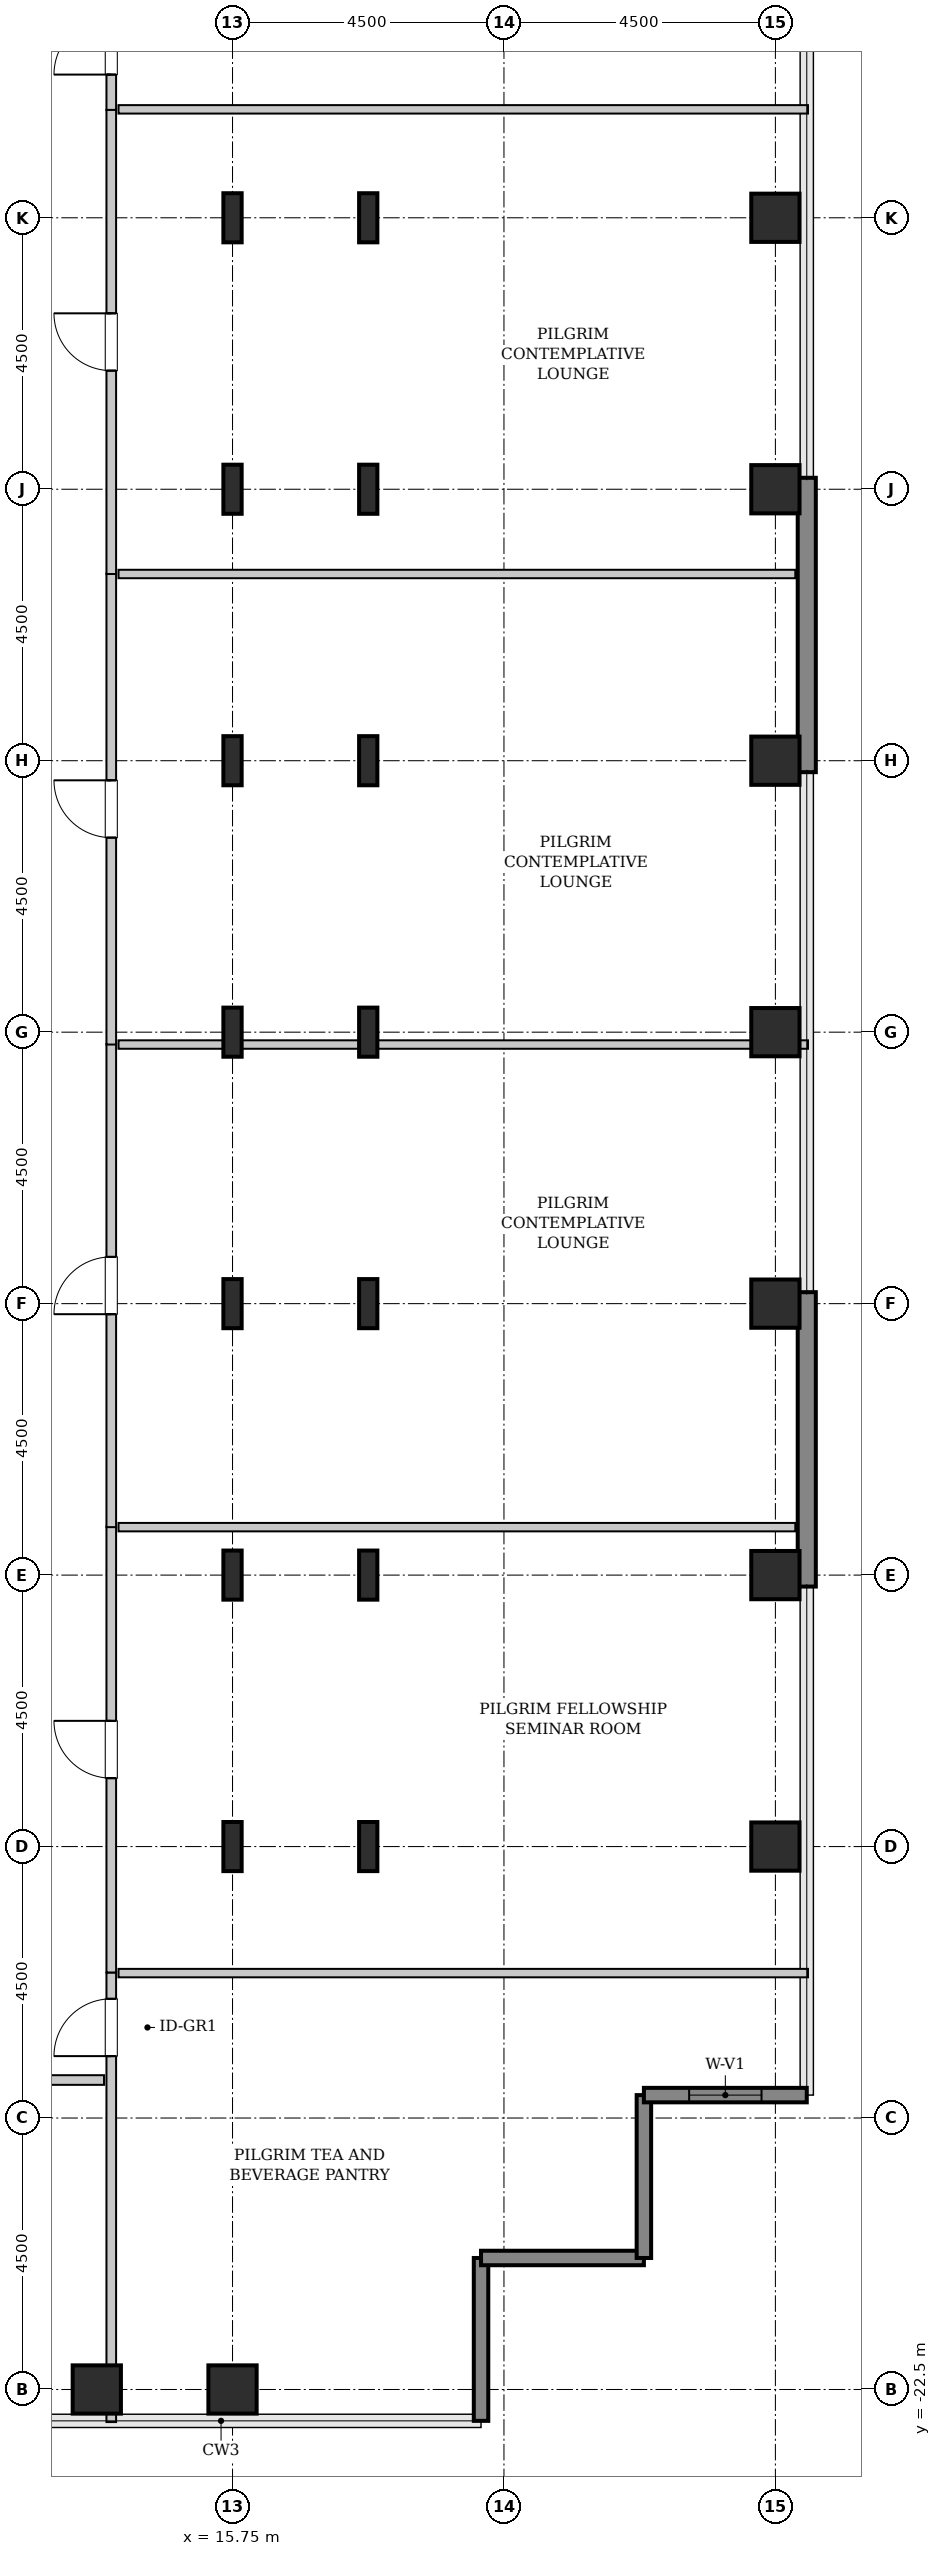
"""IFC4 building model, lengths in metres.
Left out: names, types, materials, properties, quantities, classifications, styles, units other than length and angle.
Written with IfcOpenShell. Run it as: python <this file> out.ifc"""

import sys

from ifc_helpers import new_model, si_unit, direction, frame, frame_2d, origin, origin_2d, place, context, subcontext, project, spatial, rectangle, hollow_rectangle, i_section, extrude, source, transform, mapped, element, fill, save


model = new_model("IFC4")
c1 = context("Model", 3, precision=1e-05, world=origin(), true_north=direction((0.0, 1.0)))
c2 = subcontext(c1, "Body", "Model", "MODEL_VIEW")
j1 = project(units=[si_unit("LENGTHUNIT", "METRE"), si_unit("PLANEANGLEUNIT", "RADIAN")], contexts=[c1])
p1 = place(None, origin())
s1 = spatial("IfcSite", under=j1, at=p1, CompositionType="ELEMENT")
p2 = place(p1, origin())
s2 = spatial("IfcBuilding", under=s1, at=p2, CompositionType="ELEMENT")
p3 = place(p2, frame((0.0, 0.0, 194.4)))
s3 = spatial("IfcBuildingStorey", under=s2, at=p3, CompositionType="ELEMENT", Elevation=194.4)
m1 = source(origin(), c2, "Body", "SweptSolid", [
    extrude(hollow_rectangle(XDim=0.8, YDim=0.8, WallThickness=0.04, InnerFilletRadius=0.04, OuterFilletRadius=0.08, at=origin_2d()), origin(), (0.0, 0.0, 1.0), 3.8),
])
for number, where, z_axis, x_axis in (
    (1, (13.5, -22.5, 0.0), (0.0, 0.0, 1.0), (1.0, 0.0, 0.0)),
    (2, (15.75, -22.5, 0.0), (0.0, 0.0, 1.0), (1.0, 0.0, 0.0)),
):
    element("IfcColumn", number, at=place(p3, frame(where, z_axis=z_axis, x_axis=x_axis)), inside=s3, PredefinedType="COLUMN", context=c2, shape_type="MappedRepresentation", body=[
        mapped(m1, transform((0.0, 0.0, 0.0), x_axis=(1.0, 0.0, 0.0), y_axis=(0.0, 1.0, 0.0), z_axis=(0.0, 0.0, 1.0), scale=1.0)),
    ])
m2 = source(origin(), c2, "Body", "SweptSolid", [
    extrude(i_section(OverallWidth=0.303, OverallDepth=0.814, WebThickness=0.021, FlangeThickness=0.04, FilletRadius=0.03, at=origin_2d()), origin(), (0.0, 0.0, 1.0), 3.8),
])
for number, where, z_axis, x_axis in (
    (3, (15.75, -13.5, 0.0), (0.0, 0.0, 1.0), (1.0, 0.0, 0.0)),
    (4, (15.75, -9.0, 0.0), (0.0, 0.0, 1.0), (1.0, 0.0, 0.0)),
    (5, (15.75, -4.5, 0.0), (0.0, 0.0, 1.0), (1.0, 0.0, 0.0)),
    (6, (15.75, 0.0, 0.0), (0.0, 0.0, 1.0), (1.0, 0.0, 0.0)),
    (7, (15.75, 4.5, 0.0), (0.0, 0.0, 1.0), (1.0, 0.0, 0.0)),
    (8, (15.75, 9.0, 0.0), (0.0, 0.0, 1.0), (1.0, 0.0, 0.0)),
    (9, (15.75, 13.5, 0.0), (0.0, 0.0, 1.0), (1.0, 0.0, 0.0)),
    (10, (18.0, -13.5, 0.0), (0.0, 0.0, 1.0), (1.0, 0.0, 0.0)),
    (11, (18.0, -9.0, 0.0), (0.0, 0.0, 1.0), (1.0, 0.0, 0.0)),
    (12, (18.0, -4.5, 0.0), (0.0, 0.0, 1.0), (1.0, 0.0, 0.0)),
    (13, (18.0, 0.0, 0.0), (0.0, 0.0, 1.0), (1.0, 0.0, 0.0)),
    (14, (18.0, 4.5, 0.0), (0.0, 0.0, 1.0), (1.0, 0.0, 0.0)),
    (15, (18.0, 9.0, 0.0), (0.0, 0.0, 1.0), (1.0, 0.0, 0.0)),
    (16, (18.0, 13.5, 0.0), (0.0, 0.0, 1.0), (1.0, 0.0, 0.0)),
):
    element("IfcColumn", number, at=place(p3, frame(where, z_axis=z_axis, x_axis=x_axis)), inside=s3, PredefinedType="COLUMN", context=c2, shape_type="MappedRepresentation", body=[
        mapped(m2, transform((0.0, 0.0, 0.0), x_axis=(1.0, 0.0, 0.0), y_axis=(0.0, 1.0, 0.0), z_axis=(0.0, 0.0, 1.0), scale=1.0)),
    ])
for number, where, z_axis, x_axis in (
    (17, (24.75, -13.5, 0.0), (0.0, 0.0, 1.0), (1.0, 0.0, 0.0)),
    (18, (24.75, -9.0, 0.0), (0.0, 0.0, 1.0), (1.0, 0.0, 0.0)),
    (19, (24.75, -4.5, 0.0), (0.0, 0.0, 1.0), (1.0, 0.0, 0.0)),
    (20, (24.75, 0.0, 0.0), (0.0, 0.0, 1.0), (1.0, 0.0, 0.0)),
    (21, (24.75, 4.5, 0.0), (0.0, 0.0, 1.0), (1.0, 0.0, 0.0)),
    (22, (24.75, 9.0, 0.0), (0.0, 0.0, 1.0), (1.0, 0.0, 0.0)),
    (23, (24.75, 13.5, 0.0), (0.0, 0.0, 1.0), (1.0, 0.0, 0.0)),
):
    element("IfcColumn", number, at=place(p3, frame(where, z_axis=z_axis, x_axis=x_axis)), inside=s3, PredefinedType="COLUMN", context=c2, shape_type="MappedRepresentation", body=[
        mapped(m1, transform((0.0, 0.0, 0.0), x_axis=(1.0, 0.0, 0.0), y_axis=(0.0, 1.0, 0.0), z_axis=(0.0, 0.0, 1.0), scale=1.0)),
    ])
m3 = source(origin(), c2, "Body", "SweptSolid", [
    extrude(rectangle(XDim=4.88, YDim=0.3, at=frame_2d((2.44, 0.0))), origin(), (0.0, 0.0, 1.0), 3.55),
])
for number, where, z_axis, x_axis in (
    (24, (25.27, -9.19, 0.0), (0.0, 0.0, 1.0), (0.0, 1.0, 0.0)),
    (25, (25.27, 4.31, 0.0), (0.0, 0.0, 1.0), (0.0, 1.0, 0.0)),
):
    element("IfcWall", number, at=place(p3, frame(where, z_axis=z_axis, x_axis=x_axis)), inside=s3, PredefinedType="SHEAR", context=c2, shape_type="MappedRepresentation", body=[
        mapped(m3, transform((0.0, 0.0, 0.0), x_axis=(1.0, 0.0, 0.0), y_axis=(0.0, 1.0, 0.0), z_axis=(0.0, 0.0, 1.0), scale=1.0)),
    ])
m4 = source(origin(), c2, "Body", "SweptSolid", [
    extrude(rectangle(XDim=2.7, YDim=0.24, at=frame_2d((1.35, 0.0))), origin(), (0.0, 0.0, 1.0), 3.55),
])
for number, where, z_axis, x_axis in (
    (26, (19.87, -23.02, 0.0), (0.0, 0.0, 1.0), (0.0, 1.0, 0.0)),
    (27, (19.87, -20.32, 0.0), (0.0, 0.0, 1.0), (1.0, 0.0, 0.0)),
    (28, (22.57, -20.32, 0.0), (0.0, 0.0, 1.0), (0.0, 1.0, 0.0)),
):
    element("IfcWall", number, at=place(p3, frame(where, z_axis=z_axis, x_axis=x_axis)), inside=s3, PredefinedType="SHEAR", context=c2, shape_type="MappedRepresentation", body=[
        mapped(m4, transform((0.0, 0.0, 0.0), x_axis=(1.0, 0.0, 0.0), y_axis=(0.0, 1.0, 0.0), z_axis=(0.0, 0.0, 1.0), scale=1.0)),
    ])
p4 = place(p3, frame((22.57, -17.62, 0.0), z_axis=(0.0, 0.0, 1.0), x_axis=(1.0, 0.0, 0.0)))
e29 = element("IfcWall", 29, at=p4, inside=s3, PredefinedType="SHEAR", context=c2, shape_type="MappedRepresentation", body=[
    mapped(m4, transform((0.0, 0.0, 0.0), x_axis=(1.0, 0.0, 0.0), y_axis=(0.0, 1.0, 0.0), z_axis=(0.0, 0.0, 1.0), scale=1.0)),
])
p5 = place(p4, frame((0.75, 0.0, 0.85)))
e30 = element("IfcOpeningElement", 30, at=p5, cuts=e29, PredefinedType="OPENING", context=c2, shape_type="SweptSolid", body=[
    extrude(rectangle(XDim=1.2, YDim=1.8, at=frame_2d((0.6, 0.9))), frame((0.0, 0.13, 0.0), z_axis=(0.0, -1.0, 0.0), x_axis=(1.0, 0.0, 0.0)), (0.0, 0.0, 1.0), 0.26),
])
m5 = source(origin(), c2, "Body", "SweptSolid", [
    extrude(rectangle(XDim=7.453, YDim=0.16, at=frame_2d((3.726, 0.0))), origin(), (0.0, 0.0, 1.0), 3.535),
])
p6 = place(p3, frame((13.74, -23.04, 0.0), z_axis=(0.0, 0.0, 1.0), x_axis=(0.0, 1.0, 0.0)))
e31 = element("IfcWall", 31, at=p6, inside=s3, PredefinedType="PARTITIONING", context=c2, shape_type="MappedRepresentation", body=[
    mapped(m5, transform((0.0, 0.0, 0.0), x_axis=(1.0, 0.0, 0.0), y_axis=(0.0, 1.0, 0.0), z_axis=(0.0, 0.0, 1.0), scale=1.0)),
])
p7 = place(p6, frame((6.066, 0.0, 0.0)))
e32 = element("IfcOpeningElement", 32, at=p7, cuts=e31, PredefinedType="OPENING", context=c2, shape_type="SweptSolid", body=[
    extrude(rectangle(XDim=0.95, YDim=2.1, at=frame_2d((0.475, 1.05))), frame((0.0, 0.09, 0.0), z_axis=(0.0, -1.0, 0.0), x_axis=(1.0, 0.0, 0.0)), (0.0, 0.0, 1.0), 0.18),
])
m6 = source(origin(), c2, "Body", "SweptSolid", [
    extrude(rectangle(XDim=11.43, YDim=0.14, at=frame_2d((5.715, 0.0))), origin(), (0.0, 0.0, 1.0), 3.535),
])
p8 = place(p3, frame((13.86, -15.597, 0.0), z_axis=(0.0, 0.0, 1.0), x_axis=(1.0, 0.0, 0.0)))
e33 = element("IfcWall", 33, at=p8, inside=s3, PredefinedType="PARTITIONING", context=c2, shape_type="MappedRepresentation", body=[
    mapped(m6, transform((0.0, 0.0, 0.0), x_axis=(1.0, 0.0, 0.0), y_axis=(0.0, 1.0, 0.0), z_axis=(0.0, 0.0, 1.0), scale=1.0)),
])
m7 = source(origin(), c2, "Body", "SweptSolid", [
    extrude(rectangle(XDim=7.392, YDim=0.16, at=frame_2d((3.696, 0.0))), origin(), (0.0, 0.0, 1.0), 3.535),
])
p9 = place(p3, frame((13.74, -15.587, 0.0), z_axis=(0.0, 0.0, 1.0), x_axis=(0.0, 1.0, 0.0)))
e34 = element("IfcWall", 34, at=p9, inside=s3, PredefinedType="PARTITIONING", context=c2, shape_type="MappedRepresentation", body=[
    mapped(m7, transform((0.0, 0.0, 0.0), x_axis=(1.0, 0.0, 0.0), y_axis=(0.0, 1.0, 0.0), z_axis=(0.0, 0.0, 1.0), scale=1.0)),
])
p10 = place(p9, frame((3.221, 0.0, 0.0)))
e35 = element("IfcOpeningElement", 35, at=p10, cuts=e34, PredefinedType="OPENING", context=c2, shape_type="SweptSolid", body=[
    extrude(rectangle(XDim=0.95, YDim=2.1, at=frame_2d((0.475, 1.05))), frame((0.0, 0.09, 0.0), z_axis=(0.0, -1.0, 0.0), x_axis=(1.0, 0.0, 0.0)), (0.0, 0.0, 1.0), 0.18),
])
m8 = source(origin(), c2, "Body", "SweptSolid", [
    extrude(rectangle(XDim=11.22, YDim=0.14, at=frame_2d((5.61, 0.0))), origin(), (0.0, 0.0, 1.0), 3.535),
])
p11 = place(p3, frame((13.86, -8.205, 0.0), z_axis=(0.0, 0.0, 1.0), x_axis=(1.0, 0.0, 0.0)))
e36 = element("IfcWall", 36, at=p11, inside=s3, PredefinedType="PARTITIONING", context=c2, shape_type="MappedRepresentation", body=[
    mapped(m8, transform((0.0, 0.0, 0.0), x_axis=(1.0, 0.0, 0.0), y_axis=(0.0, 1.0, 0.0), z_axis=(0.0, 0.0, 1.0), scale=1.0)),
])
m9 = source(origin(), c2, "Body", "SweptSolid", [
    extrude(rectangle(XDim=8.01, YDim=0.16, at=frame_2d((4.005, 0.0))), origin(), (0.0, 0.0, 1.0), 3.535),
])
p12 = place(p3, frame((13.74, -8.205, 0.0), z_axis=(0.0, 0.0, 1.0), x_axis=(0.0, 1.0, 0.0)))
e37 = element("IfcWall", 37, at=p12, inside=s3, PredefinedType="PARTITIONING", context=c2, shape_type="MappedRepresentation", body=[
    mapped(m9, transform((0.0, 0.0, 0.0), x_axis=(1.0, 0.0, 0.0), y_axis=(0.0, 1.0, 0.0), z_axis=(0.0, 0.0, 1.0), scale=1.0)),
])
p13 = place(p12, frame((3.53, 0.0, 0.0)))
e38 = element("IfcOpeningElement", 38, at=p13, cuts=e37, PredefinedType="OPENING", context=c2, shape_type="SweptSolid", body=[
    extrude(rectangle(XDim=0.95, YDim=2.1, at=frame_2d((0.475, 1.05))), frame((0.0, 0.09, 0.0), z_axis=(0.0, -1.0, 0.0), x_axis=(1.0, 0.0, 0.0)), (0.0, 0.0, 1.0), 0.18),
])
m10 = source(origin(), c2, "Body", "SweptSolid", [
    extrude(rectangle(XDim=11.43, YDim=0.14, at=frame_2d((5.715, 0.0))), origin(), (0.0, 0.0, 1.0), 2.875),
])
p14 = place(p3, frame((13.86, -0.205, 0.0), z_axis=(0.0, 0.0, 1.0), x_axis=(1.0, 0.0, 0.0)))
e39 = element("IfcWall", 39, at=p14, inside=s3, PredefinedType="PARTITIONING", context=c2, shape_type="MappedRepresentation", body=[
    mapped(m10, transform((0.0, 0.0, 0.0), x_axis=(1.0, 0.0, 0.0), y_axis=(0.0, 1.0, 0.0), z_axis=(0.0, 0.0, 1.0), scale=1.0)),
])
m11 = source(origin(), c2, "Body", "SweptSolid", [
    extrude(rectangle(XDim=7.81, YDim=0.16, at=frame_2d((3.905, 0.0))), origin(), (0.0, 0.0, 1.0), 3.535),
])
p15 = place(p3, frame((13.74, -0.205, 0.0), z_axis=(0.0, 0.0, 1.0), x_axis=(0.0, 1.0, 0.0)))
e40 = element("IfcWall", 40, at=p15, inside=s3, PredefinedType="PARTITIONING", context=c2, shape_type="MappedRepresentation", body=[
    mapped(m11, transform((0.0, 0.0, 0.0), x_axis=(1.0, 0.0, 0.0), y_axis=(0.0, 1.0, 0.0), z_axis=(0.0, 0.0, 1.0), scale=1.0)),
])
p16 = place(p15, frame((3.43, 0.0, 0.0)))
e41 = element("IfcOpeningElement", 41, at=p16, cuts=e40, PredefinedType="OPENING", context=c2, shape_type="SweptSolid", body=[
    extrude(rectangle(XDim=0.95, YDim=2.1, at=frame_2d((0.475, 1.05))), frame((0.0, 0.09, 0.0), z_axis=(0.0, -1.0, 0.0), x_axis=(1.0, 0.0, 0.0)), (0.0, 0.0, 1.0), 0.18),
])
p17 = place(p3, frame((13.86, 7.595, 0.0), z_axis=(0.0, 0.0, 1.0), x_axis=(1.0, 0.0, 0.0)))
e42 = element("IfcWall", 42, at=p17, inside=s3, PredefinedType="PARTITIONING", context=c2, shape_type="MappedRepresentation", body=[
    mapped(m8, transform((0.0, 0.0, 0.0), x_axis=(1.0, 0.0, 0.0), y_axis=(0.0, 1.0, 0.0), z_axis=(0.0, 0.0, 1.0), scale=1.0)),
])
m12 = source(origin(), c2, "Body", "SweptSolid", [
    extrude(rectangle(XDim=7.752, YDim=0.16, at=frame_2d((3.876, 0.0))), origin(), (0.0, 0.0, 1.0), 3.535),
])
p18 = place(p3, frame((13.74, 15.288, 0.0), z_axis=(0.0, 0.0, 1.0), x_axis=(0.0, 1.0, 0.0)))
e43 = element("IfcWall", 43, at=p18, inside=s3, PredefinedType="PARTITIONING", context=c2, shape_type="MappedRepresentation", body=[
    mapped(m12, transform((0.0, 0.0, 0.0), x_axis=(1.0, 0.0, 0.0), y_axis=(0.0, 1.0, 0.0), z_axis=(0.0, 0.0, 1.0), scale=1.0)),
])
p19 = place(p18, frame((0.586, 0.0, 0.0)))
e44 = element("IfcOpeningElement", 44, at=p19, cuts=e43, PredefinedType="OPENING", context=c2, shape_type="SweptSolid", body=[
    extrude(rectangle(XDim=0.95, YDim=2.1, at=frame_2d((0.475, 1.05))), frame((0.0, 0.09, 0.0), z_axis=(0.0, -1.0, 0.0), x_axis=(1.0, 0.0, 0.0)), (0.0, 0.0, 1.0), 0.18),
])
p20 = place(p3, frame((13.86, 15.298, 0.0), z_axis=(0.0, 0.0, 1.0), x_axis=(1.0, 0.0, 0.0)))
e45 = element("IfcWall", 45, at=p20, inside=s3, PredefinedType="PARTITIONING", context=c2, shape_type="MappedRepresentation", body=[
    mapped(m6, transform((0.0, 0.0, 0.0), x_axis=(1.0, 0.0, 0.0), y_axis=(0.0, 1.0, 0.0), z_axis=(0.0, 0.0, 1.0), scale=1.0)),
])
m13 = source(origin(), c2, "Body", "SweptSolid", [
    extrude(rectangle(XDim=7.693, YDim=0.16, at=frame_2d((3.846, 0.0))), origin(), (0.0, 0.0, 1.0), 3.535),
])
p21 = place(p3, frame((13.74, 7.595, 0.0), z_axis=(0.0, 0.0, 1.0), x_axis=(0.0, 1.0, 0.0)))
e46 = element("IfcWall", 46, at=p21, inside=s3, PredefinedType="PARTITIONING", context=c2, shape_type="MappedRepresentation", body=[
    mapped(m13, transform((0.0, 0.0, 0.0), x_axis=(1.0, 0.0, 0.0), y_axis=(0.0, 1.0, 0.0), z_axis=(0.0, 0.0, 1.0), scale=1.0)),
])
p22 = place(p21, frame((3.371, 0.0, 0.0)))
e47 = element("IfcOpeningElement", 47, at=p22, cuts=e46, PredefinedType="OPENING", context=c2, shape_type="SweptSolid", body=[
    extrude(rectangle(XDim=0.95, YDim=2.1, at=frame_2d((0.475, 1.05))), frame((0.0, 0.09, 0.0), z_axis=(0.0, -1.0, 0.0), x_axis=(1.0, 0.0, 0.0)), (0.0, 0.0, 1.0), 0.18),
])
m14 = source(origin(), c2, "Body", "SweptSolid", [
    extrude(rectangle(XDim=9.025, YDim=0.16, at=frame_2d((4.513, 0.0))), origin(), (0.0, 0.0, 1.0), 3.535),
])
p23 = place(p3, frame((4.595, -17.37, 0.0), z_axis=(0.0, 0.0, 1.0), x_axis=(1.0, 0.0, 0.0)))
e48 = element("IfcWall", 48, at=p23, inside=s3, PredefinedType="PARTITIONING", context=c2, shape_type="MappedRepresentation", body=[
    mapped(m14, transform((0.0, 0.0, 0.0), x_axis=(1.0, 0.0, 0.0), y_axis=(0.0, 1.0, 0.0), z_axis=(0.0, 0.0, 1.0), scale=1.0)),
])
p24 = place(p23, frame((4.038, 0.0, 0.0)))
e49 = element("IfcOpeningElement", 49, at=p24, cuts=e48, PredefinedType="OPENING", context=c2, shape_type="SweptSolid", body=[
    extrude(rectangle(XDim=0.95, YDim=2.1, at=frame_2d((0.475, 1.05))), frame((0.0, 0.09, 0.0), z_axis=(0.0, -1.0, 0.0), x_axis=(1.0, 0.0, 0.0)), (0.0, 0.0, 1.0), 0.18),
])
m15 = source(origin(), c2, "Body", "SweptSolid", [
    extrude(rectangle(XDim=1.2, YDim=1.8, at=frame_2d((0.6, 0.9))), frame((0.0, 0.03, 0.0), z_axis=(0.0, -1.0, 0.0), x_axis=(1.0, 0.0, 0.0)), (0.0, 0.0, 1.0), 0.06),
])
p25 = place(p5, origin())
e50 = element("IfcWindow", 50, at=p25, inside=s3, PartitioningType="SINGLE_PANEL", PredefinedType="WINDOW", context=c2, shape_type="MappedRepresentation", body=[
    mapped(m15, transform((0.0, 0.0, 0.0), x_axis=(1.0, 0.0, 0.0), y_axis=(0.0, 1.0, 0.0), z_axis=(0.0, 0.0, 1.0), scale=1.0)),
])
fill(e30, e50)
m16 = source(origin(), c2, "Body", "SweptSolid", [
    extrude(rectangle(XDim=0.95, YDim=2.1, at=frame_2d((0.475, 1.05))), frame((0.0, 0.025, 0.0), z_axis=(0.0, -1.0, 0.0), x_axis=(1.0, 0.0, 0.0)), (0.0, 0.0, 1.0), 0.05),
])
p26 = place(p7, origin())
e51 = element("IfcDoor", 51, at=p26, inside=s3, OperationType="SINGLE_SWING_LEFT", PredefinedType="DOOR", context=c2, shape_type="MappedRepresentation", body=[
    mapped(m16, transform((0.0, 0.0, 0.0), x_axis=(1.0, 0.0, 0.0), y_axis=(0.0, 1.0, 0.0), z_axis=(0.0, 0.0, 1.0), scale=1.0)),
])
fill(e32, e51)
p27 = place(p10, origin())
e52 = element("IfcDoor", 52, at=p27, inside=s3, OperationType="SINGLE_SWING_RIGHT", PredefinedType="DOOR", context=c2, shape_type="MappedRepresentation", body=[
    mapped(m16, transform((0.0, 0.0, 0.0), x_axis=(1.0, 0.0, 0.0), y_axis=(0.0, 1.0, 0.0), z_axis=(0.0, 0.0, 1.0), scale=1.0)),
])
fill(e35, e52)
p28 = place(p13, origin())
e53 = element("IfcDoor", 53, at=p28, inside=s3, OperationType="SINGLE_SWING_LEFT", PredefinedType="DOOR", context=c2, shape_type="MappedRepresentation", body=[
    mapped(m16, transform((0.0, 0.0, 0.0), x_axis=(1.0, 0.0, 0.0), y_axis=(0.0, 1.0, 0.0), z_axis=(0.0, 0.0, 1.0), scale=1.0)),
])
fill(e38, e53)
p29 = place(p16, origin())
e54 = element("IfcDoor", 54, at=p29, inside=s3, OperationType="SINGLE_SWING_RIGHT", PredefinedType="DOOR", context=c2, shape_type="MappedRepresentation", body=[
    mapped(m16, transform((0.0, 0.0, 0.0), x_axis=(1.0, 0.0, 0.0), y_axis=(0.0, 1.0, 0.0), z_axis=(0.0, 0.0, 1.0), scale=1.0)),
])
fill(e41, e54)
p30 = place(p19, origin())
e55 = element("IfcDoor", 55, at=p30, inside=s3, OperationType="SINGLE_SWING_LEFT", PredefinedType="DOOR", context=c2, shape_type="MappedRepresentation", body=[
    mapped(m16, transform((0.0, 0.0, 0.0), x_axis=(1.0, 0.0, 0.0), y_axis=(0.0, 1.0, 0.0), z_axis=(0.0, 0.0, 1.0), scale=1.0)),
])
fill(e44, e55)
p31 = place(p22, origin())
e56 = element("IfcDoor", 56, at=p31, inside=s3, OperationType="SINGLE_SWING_RIGHT", PredefinedType="DOOR", context=c2, shape_type="MappedRepresentation", body=[
    mapped(m16, transform((0.0, 0.0, 0.0), x_axis=(1.0, 0.0, 0.0), y_axis=(0.0, 1.0, 0.0), z_axis=(0.0, 0.0, 1.0), scale=1.0)),
])
fill(e47, e56)
save(model, sys.argv[1])
